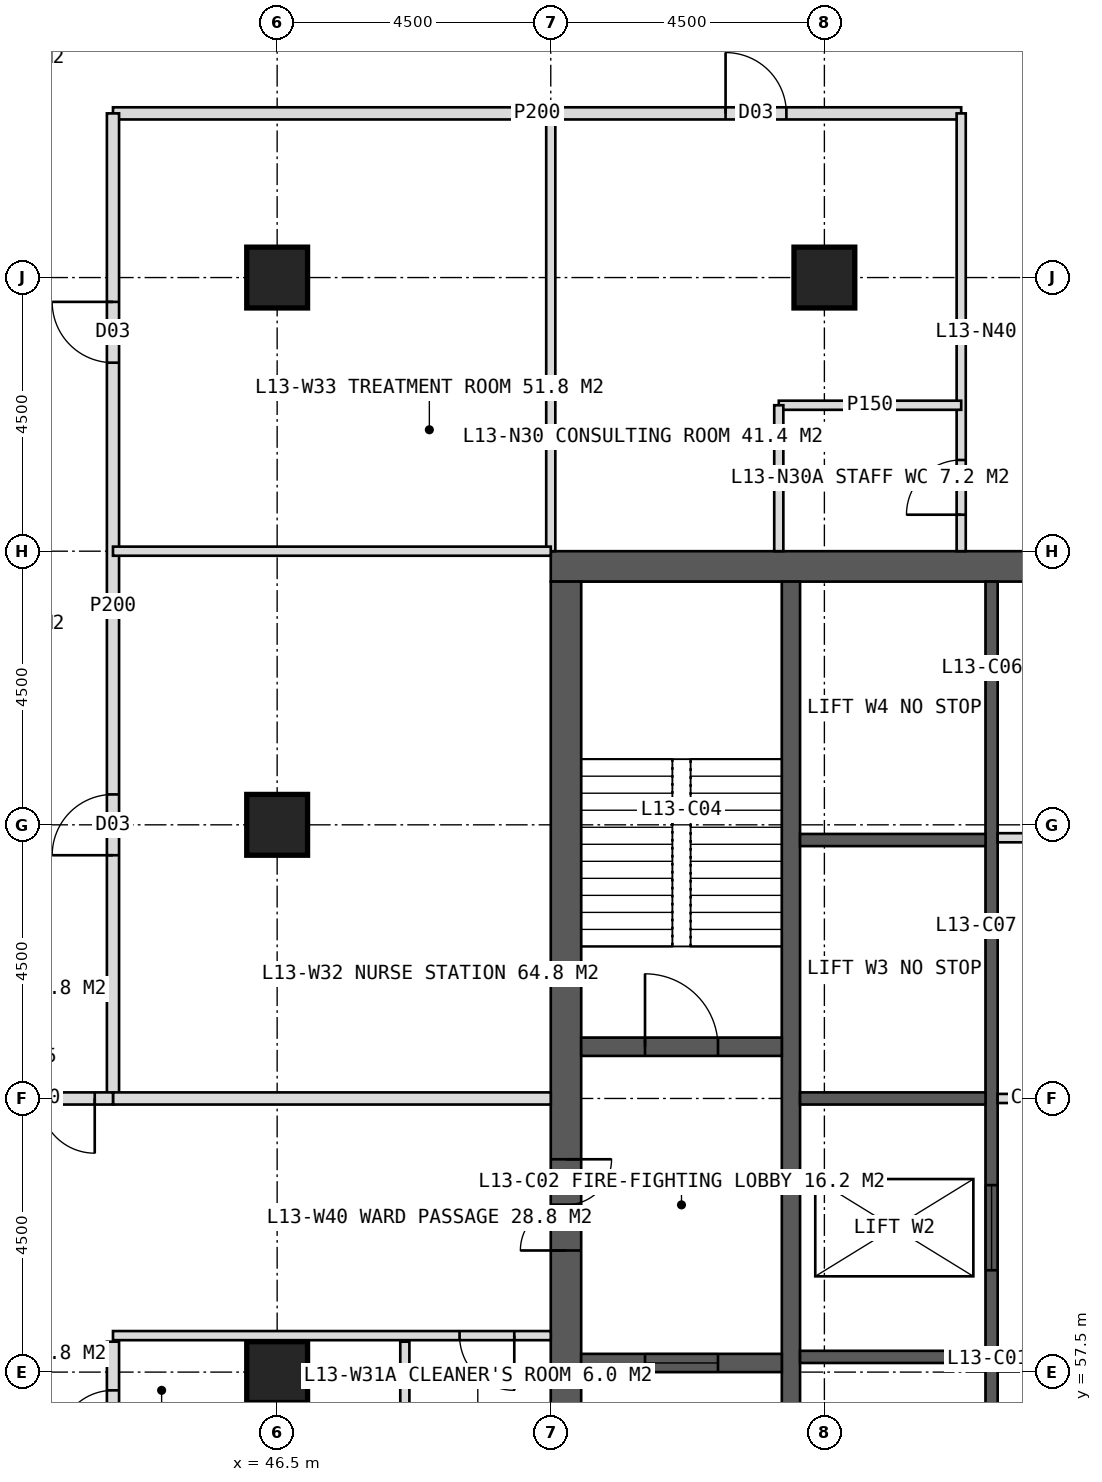
"""IFC4 building model, lengths in metres.
Left out: names, types, materials, properties, quantities, classifications, styles, units other than length and angle.
Written with IfcOpenShell. Run it as: python <this file> out.ifc"""

import sys

from ifc_helpers import new_model, si_unit, direction, frame, frame_2d, origin, origin_2d, place, context, subcontext, project, spatial, rectangle, hollow_rectangle, extrude, element, fill, save


model = new_model("IFC4")
c1 = context("Model", 3, precision=1e-05, world=origin(), true_north=direction((0.0, 1.0)))
c2 = subcontext(c1, "Body", "Model", "MODEL_VIEW")
j1 = project(units=[si_unit("LENGTHUNIT", "METRE"), si_unit("PLANEANGLEUNIT", "RADIAN")], contexts=[c1])
p1 = place(None, origin())
s1 = spatial("IfcSite", under=j1, at=p1, CompositionType="ELEMENT")
p2 = place(p1, origin())
s2 = spatial("IfcBuilding", under=s1, at=p2, CompositionType="ELEMENT")
p3 = place(p2, frame((0.0, 0.0, 59.0)))
s3 = spatial("IfcBuildingStorey", under=s2, at=p3, CompositionType="ELEMENT", Elevation=59.0)
p4 = place(p3, frame((51.0, 70.75, 0.0), z_axis=(0.0, 0.0, 1.0), x_axis=(1.0, 0.0, 0.0)))
e1 = element("IfcWall", 1, at=p4, inside=s3, PredefinedType="SHEAR", context=c2, shape_type="SweptSolid", body=[
    extrude(rectangle(XDim=18.0, YDim=0.5, at=frame_2d((9.0, 0.0))), origin(), (0.0, 0.0, 1.0), 4.0),
])
p5 = place(p4, frame((8.1, 0.0, 0.0)))
e2 = element("IfcOpeningElement", 2, at=p5, cuts=e1, PredefinedType="OPENING", context=c2, shape_type="SweptSolid", body=[
    extrude(rectangle(XDim=1.8, YDim=2.2, at=frame_2d((0.9, 1.1))), frame((0.0, 0.26, 0.0), z_axis=(0.0, -1.0, 0.0), x_axis=(1.0, 0.0, 0.0)), (0.0, 0.0, 1.0), 0.52),
])
p6 = place(p3, frame((51.25, 53.5, 0.0), z_axis=(0.0, 0.0, 1.0), x_axis=(0.0, 1.0, 0.0)))
e3 = element("IfcWall", 3, at=p6, inside=s3, PredefinedType="SHEAR", context=c2, shape_type="SweptSolid", body=[
    extrude(rectangle(XDim=17.0, YDim=0.5, at=frame_2d((8.5, 0.0))), origin(), (0.0, 0.0, 1.0), 4.0),
])
p7 = place(p6, frame((6.0, 0.0, 0.0)))
e4 = element("IfcOpeningElement", 4, at=p7, cuts=e3, PredefinedType="OPENING", context=c2, shape_type="SweptSolid", body=[
    extrude(rectangle(XDim=1.5, YDim=2.2, at=frame_2d((0.75, 1.1))), frame((0.0, 0.26, 0.0), z_axis=(0.0, -1.0, 0.0), x_axis=(1.0, 0.0, 0.0)), (0.0, 0.0, 1.0), 0.52),
])
p8 = place(p3, frame((54.95, 53.5, 0.0), z_axis=(0.0, 0.0, 1.0), x_axis=(0.0, 1.0, 0.0)))
e5 = element("IfcWall", 5, at=p8, inside=s3, PredefinedType="SHEAR", context=c2, shape_type="SweptSolid", body=[
    extrude(rectangle(XDim=17.0, YDim=0.3, at=frame_2d((8.5, 0.0))), origin(), (0.0, 0.0, 1.0), 4.0),
])
p9 = place(p3, frame((58.25, 53.5, 0.0), z_axis=(0.0, 0.0, 1.0), x_axis=(0.0, 1.0, 0.0)))
e6 = element("IfcWall", 6, at=p9, inside=s3, PredefinedType="SHEAR", context=c2, shape_type="SweptSolid", body=[
    extrude(rectangle(XDim=17.0, YDim=0.2, at=frame_2d((8.5, 0.0))), origin(), (0.0, 0.0, 1.0), 4.0),
])
p10 = place(p9, frame((1.375, 0.0, 0.0)))
e7 = element("IfcOpeningElement", 7, at=p10, cuts=e6, PredefinedType="OPENING", context=c2, shape_type="SweptSolid", body=[
    extrude(rectangle(XDim=1.4, YDim=2.2, at=frame_2d((0.7, 1.1))), frame((0.0, 0.11, 0.0), z_axis=(0.0, -1.0, 0.0), x_axis=(1.0, 0.0, 0.0)), (0.0, 0.0, 1.0), 0.22),
])
p11 = place(p9, frame((5.675, 0.0, 0.0)))
e8 = element("IfcOpeningElement", 8, at=p11, cuts=e6, PredefinedType="OPENING", context=c2, shape_type="SweptSolid", body=[
    extrude(rectangle(XDim=1.4, YDim=2.2, at=frame_2d((0.7, 1.1))), frame((0.0, 0.11, 0.0), z_axis=(0.0, -1.0, 0.0), x_axis=(1.0, 0.0, 0.0)), (0.0, 0.0, 1.0), 0.22),
])
for number, where, z_axis, x_axis in (
    (9, (55.1, 57.75, 0.0), (0.0, 0.0, 1.0), (1.0, 0.0, 0.0)),
    (10, (55.1, 62.0, 0.0), (0.0, 0.0, 1.0), (1.0, 0.0, 0.0)),
    (11, (55.1, 66.25, 0.0), (0.0, 0.0, 1.0), (1.0, 0.0, 0.0)),
):
    element("IfcWall", number, at=place(p3, frame(where, z_axis=z_axis, x_axis=x_axis)), inside=s3, PredefinedType="SHEAR", context=c2, shape_type="SweptSolid", body=[
        extrude(rectangle(XDim=3.05, YDim=0.2, at=frame_2d((1.525, 0.0))), origin(), (0.0, 0.0, 1.0), 4.0),
    ])
p12 = place(p3, frame((51.5, 62.85, 0.0), z_axis=(0.0, 0.0, 1.0), x_axis=(1.0, 0.0, 0.0)))
e12 = element("IfcWall", 12, at=p12, inside=s3, PredefinedType="SHEAR", context=c2, shape_type="SweptSolid", body=[
    extrude(rectangle(XDim=3.3, YDim=0.3, at=frame_2d((1.65, 0.0))), origin(), (0.0, 0.0, 1.0), 4.0),
])
p13 = place(p12, frame((1.05, 0.0, 0.0)))
e13 = element("IfcOpeningElement", 13, at=p13, cuts=e12, PredefinedType="OPENING", context=c2, shape_type="SweptSolid", body=[
    extrude(rectangle(XDim=1.2, YDim=2.1, at=frame_2d((0.6, 1.05))), frame((0.0, 0.16, 0.0), z_axis=(0.0, -1.0, 0.0), x_axis=(1.0, 0.0, 0.0)), (0.0, 0.0, 1.0), 0.32),
])
p14 = place(p3, frame((51.5, 57.65, 0.0), z_axis=(0.0, 0.0, 1.0), x_axis=(1.0, 0.0, 0.0)))
e14 = element("IfcWall", 14, at=p14, inside=s3, PredefinedType="SHEAR", context=c2, shape_type="SweptSolid", body=[
    extrude(rectangle(XDim=3.3, YDim=0.3, at=frame_2d((1.65, 0.0))), origin(), (0.0, 0.0, 1.0), 4.0),
])
p15 = place(p14, frame((1.05, 0.0, 0.0)))
e15 = element("IfcOpeningElement", 15, at=p15, cuts=e14, PredefinedType="OPENING", context=c2, shape_type="SweptSolid", body=[
    extrude(rectangle(XDim=1.2, YDim=2.2, at=frame_2d((0.6, 1.1))), frame((0.0, 0.16, 0.0), z_axis=(0.0, -1.0, 0.0), x_axis=(1.0, 0.0, 0.0)), (0.0, 0.0, 1.0), 0.32),
])
for number, where, z_axis, x_axis in (
    (16, (46.5, 75.5, 0.0), (0.0, 0.0, 1.0), (1.0, 0.0, 0.0)),
    (17, (55.5, 75.5, 0.0), (0.0, 0.0, 1.0), (1.0, 0.0, 0.0)),
    (18, (46.5, 57.5, 0.0), (0.0, 0.0, 1.0), (1.0, 0.0, 0.0)),
    (19, (46.5, 66.5, 0.0), (0.0, 0.0, 1.0), (1.0, 0.0, 0.0)),
):
    element("IfcColumn", number, at=place(p3, frame(where, z_axis=z_axis, x_axis=x_axis)), inside=s3, PredefinedType="COLUMN", context=c2, shape_type="SweptSolid", body=[
        extrude(hollow_rectangle(XDim=1.0, YDim=1.0, WallThickness=0.1, at=origin_2d()), origin(), (0.0, 0.0, 1.0), 4.0),
    ])
p16 = place(p3, frame((51.0, 71.0, 0.0), z_axis=(0.0, 0.0, 1.0), x_axis=(0.0, 1.0, 0.0)))
e20 = element("IfcWall", 20, at=p16, inside=s3, PredefinedType="PARTITIONING", context=c2, shape_type="SweptSolid", body=[
    extrude(rectangle(XDim=7.2, YDim=0.15, at=frame_2d((3.6, 0.0))), origin(), (0.0, 0.0, 1.0), 3.75),
])
p17 = place(p3, frame((43.8, 78.2, 0.0), z_axis=(0.0, 0.0, 1.0), x_axis=(1.0, 0.0, 0.0)))
e21 = element("IfcWall", 21, at=p17, inside=s3, PredefinedType="PARTITIONING", context=c2, shape_type="SweptSolid", body=[
    extrude(rectangle(XDim=13.95, YDim=0.2, at=frame_2d((6.975, 0.0))), origin(), (0.0, 0.0, 1.0), 3.75),
])
p18 = place(p17, frame((10.075, 0.0, 0.0)))
e22 = element("IfcOpeningElement", 22, at=p18, cuts=e21, PredefinedType="OPENING", context=c2, shape_type="SweptSolid", body=[
    extrude(rectangle(XDim=1.0, YDim=2.1, at=frame_2d((0.5, 1.05))), frame((0.0, 0.11, 0.0), z_axis=(0.0, -1.0, 0.0), x_axis=(1.0, 0.0, 0.0)), (0.0, 0.0, 1.0), 0.22),
])
p19 = place(p3, frame((57.75, 71.0, 0.0), z_axis=(0.0, 0.0, 1.0), x_axis=(0.0, 1.0, 0.0)))
e23 = element("IfcWall", 23, at=p19, inside=s3, PredefinedType="PARTITIONING", context=c2, shape_type="SweptSolid", body=[
    extrude(rectangle(XDim=7.2, YDim=0.15, at=frame_2d((3.6, 0.0))), origin(), (0.0, 0.0, 1.0), 3.75),
])
p20 = place(p19, frame((0.6, 0.0, 0.0)))
e24 = element("IfcOpeningElement", 24, at=p20, cuts=e23, PredefinedType="OPENING", context=c2, shape_type="SweptSolid", body=[
    extrude(rectangle(XDim=0.9, YDim=2.1, at=frame_2d((0.45, 1.05))), frame((0.0, 0.085, 0.0), z_axis=(0.0, -1.0, 0.0), x_axis=(1.0, 0.0, 0.0)), (0.0, 0.0, 1.0), 0.17),
])
p21 = place(p3, frame((54.75, 73.4, 0.0), z_axis=(0.0, 0.0, 1.0), x_axis=(1.0, 0.0, 0.0)))
e25 = element("IfcWall", 25, at=p21, inside=s3, PredefinedType="PARTITIONING", context=c2, shape_type="SweptSolid", body=[
    extrude(rectangle(XDim=3.0, YDim=0.15, at=frame_2d((1.5, 0.0))), origin(), (0.0, 0.0, 1.0), 3.75),
])
p22 = place(p3, frame((54.75, 71.0, 0.0), z_axis=(0.0, 0.0, 1.0), x_axis=(0.0, 1.0, 0.0)))
e26 = element("IfcWall", 26, at=p22, inside=s3, PredefinedType="PARTITIONING", context=c2, shape_type="SweptSolid", body=[
    extrude(rectangle(XDim=2.4, YDim=0.15, at=frame_2d((1.2, 0.0))), origin(), (0.0, 0.0, 1.0), 3.75),
])
p23 = place(p3, frame((43.8, 45.8, 0.0), z_axis=(0.0, 0.0, 1.0), x_axis=(0.0, 1.0, 0.0)))
e27 = element("IfcWall", 27, at=p23, inside=s3, PredefinedType="PARTITIONING", context=c2, shape_type="SweptSolid", body=[
    extrude(rectangle(XDim=12.2, YDim=0.2, at=frame_2d((6.1, 0.0))), origin(), (0.0, 0.0, 1.0), 3.75),
])
p24 = place(p23, frame((8.0, 0.0, 0.0)))
e28 = element("IfcOpeningElement", 28, at=p24, cuts=e27, PredefinedType="OPENING", context=c2, shape_type="SweptSolid", body=[
    extrude(rectangle(XDim=0.9, YDim=2.1, at=frame_2d((0.45, 1.05))), frame((0.0, 0.11, 0.0), z_axis=(0.0, -1.0, 0.0), x_axis=(1.0, 0.0, 0.0)), (0.0, 0.0, 1.0), 0.22),
])
p25 = place(p23, frame((10.5, 0.0, 0.0)))
e29 = element("IfcOpeningElement", 29, at=p25, cuts=e27, PredefinedType="OPENING", context=c2, shape_type="SweptSolid", body=[
    extrude(rectangle(XDim=0.9, YDim=2.1, at=frame_2d((0.45, 1.05))), frame((0.0, 0.11, 0.0), z_axis=(0.0, -1.0, 0.0), x_axis=(1.0, 0.0, 0.0)), (0.0, 0.0, 1.0), 0.22),
])
p26 = place(p3, frame((43.8, 62.0, 0.0), z_axis=(0.0, 0.0, 1.0), x_axis=(0.0, 1.0, 0.0)))
e30 = element("IfcWall", 30, at=p26, inside=s3, PredefinedType="PARTITIONING", context=c2, shape_type="SweptSolid", body=[
    extrude(rectangle(XDim=16.2, YDim=0.2, at=frame_2d((8.1, 0.0))), origin(), (0.0, 0.0, 1.0), 3.75),
])
p27 = place(p26, frame((4.0, 0.0, 0.0)))
e31 = element("IfcOpeningElement", 31, at=p27, cuts=e30, PredefinedType="OPENING", context=c2, shape_type="SweptSolid", body=[
    extrude(rectangle(XDim=1.0, YDim=2.1, at=frame_2d((0.5, 1.05))), frame((0.0, 0.11, 0.0), z_axis=(0.0, -1.0, 0.0), x_axis=(1.0, 0.0, 0.0)), (0.0, 0.0, 1.0), 0.22),
])
p28 = place(p26, frame((12.1, 0.0, 0.0)))
e32 = element("IfcOpeningElement", 32, at=p28, cuts=e30, PredefinedType="OPENING", context=c2, shape_type="SweptSolid", body=[
    extrude(rectangle(XDim=1.0, YDim=2.1, at=frame_2d((0.5, 1.05))), frame((0.0, 0.11, 0.0), z_axis=(0.0, -1.0, 0.0), x_axis=(1.0, 0.0, 0.0)), (0.0, 0.0, 1.0), 0.22),
])
p29 = place(p3, frame((51.0, 58.1, 0.0), z_axis=(0.0, 0.0, 1.0), x_axis=(-1.0, 0.0, 0.0)))
e33 = element("IfcWall", 33, at=p29, inside=s3, PredefinedType="PARTITIONING", context=c2, shape_type="SweptSolid", body=[
    extrude(rectangle(XDim=7.2, YDim=0.15, at=frame_2d((3.6, 0.0))), origin(), (0.0, 0.0, 1.0), 3.75),
])
p30 = place(p29, frame((0.6, 0.0, 0.0)))
e34 = element("IfcOpeningElement", 34, at=p30, cuts=e33, PredefinedType="OPENING", context=c2, shape_type="SweptSolid", body=[
    extrude(rectangle(XDim=0.9, YDim=2.1, at=frame_2d((0.45, 1.05))), frame((0.0, 0.085, 0.0), z_axis=(0.0, -1.0, 0.0), x_axis=(1.0, 0.0, 0.0)), (0.0, 0.0, 1.0), 0.17),
])
p31 = place(p3, frame((51.0, 62.0, 0.0), z_axis=(0.0, 0.0, 1.0), x_axis=(-1.0, 0.0, 0.0)))
e35 = element("IfcWall", 35, at=p31, inside=s3, PredefinedType="SOLIDWALL", context=c2, shape_type="SweptSolid", body=[
    extrude(rectangle(XDim=7.2, YDim=0.2, at=frame_2d((3.6, 0.0))), origin(), (0.0, 0.0, 1.0), 2.75),
])
p32 = place(p3, frame((51.0, 71.0, 0.0), z_axis=(0.0, 0.0, 1.0), x_axis=(-1.0, 0.0, 0.0)))
e36 = element("IfcWall", 36, at=p32, inside=s3, PredefinedType="PARTITIONING", context=c2, shape_type="SweptSolid", body=[
    extrude(rectangle(XDim=7.2, YDim=0.15, at=frame_2d((3.6, 0.0))), origin(), (0.0, 0.0, 1.0), 3.75),
])
p33 = place(p3, frame((48.6, 55.5, 0.0), z_axis=(0.0, 0.0, 1.0), x_axis=(0.0, 1.0, 0.0)))
e37 = element("IfcWall", 37, at=p33, inside=s3, PredefinedType="PARTITIONING", context=c2, shape_type="SweptSolid", body=[
    extrude(rectangle(XDim=2.5, YDim=0.15, at=frame_2d((1.25, 0.0))), origin(), (0.0, 0.0, 1.0), 3.75),
])
p34 = place(p3, frame((43.8, 62.0, 0.0), z_axis=(0.0, 0.0, 1.0), x_axis=(-1.0, 0.0, 0.0)))
e38 = element("IfcWall", 38, at=p34, inside=s3, PredefinedType="SOLIDWALL", context=c2, shape_type="SweptSolid", body=[
    extrude(rectangle(XDim=2.7, YDim=0.2, at=frame_2d((1.35, 0.0))), origin(), (0.0, 0.0, 1.0), 2.75),
])
p35 = place(p34, frame((0.3, 0.0, 0.0)))
e39 = element("IfcOpeningElement", 39, at=p35, cuts=e38, PredefinedType="OPENING", context=c2, shape_type="SweptSolid", body=[
    extrude(rectangle(XDim=1.8, YDim=2.2, at=frame_2d((0.9, 1.1))), frame((0.0, 0.11, 0.0), z_axis=(0.0, -1.0, 0.0), x_axis=(1.0, 0.0, 0.0)), (0.0, 0.0, 1.0), 0.22),
])
p36 = place(p3, frame((58.35, 62.0, 0.0), z_axis=(0.0, 0.0, 1.0), x_axis=(1.0, 0.0, 0.0)))
e40 = element("IfcWall", 40, at=p36, inside=s3, PredefinedType="PARTITIONING", context=c2, shape_type="SweptSolid", body=[
    extrude(rectangle(XDim=3.3, YDim=0.15, at=frame_2d((1.65, 0.0))), origin(), (0.0, 0.0, 1.0), 3.75),
])
p37 = place(p36, frame((1.15, 0.0, 0.0)))
e41 = element("IfcOpeningElement", 41, at=p37, cuts=e40, PredefinedType="OPENING", context=c2, shape_type="SweptSolid", body=[
    extrude(rectangle(XDim=1.0, YDim=2.1, at=frame_2d((0.5, 1.05))), frame((0.0, 0.085, 0.0), z_axis=(0.0, -1.0, 0.0), x_axis=(1.0, 0.0, 0.0)), (0.0, 0.0, 1.0), 0.17),
])
p38 = place(p3, frame((58.35, 66.288, 0.0), z_axis=(0.0, 0.0, 1.0), x_axis=(1.0, 0.0, 0.0)))
e42 = element("IfcWall", 42, at=p38, inside=s3, PredefinedType="PARTITIONING", context=c2, shape_type="SweptSolid", body=[
    extrude(rectangle(XDim=3.3, YDim=0.15, at=frame_2d((1.65, 0.0))), origin(), (0.0, 0.0, 1.0), 3.75),
])
p39 = place(p20, origin())
e43 = element("IfcDoor", 43, at=p39, inside=s3, OperationType="SINGLE_SWING_LEFT", PredefinedType="DOOR", context=c2, shape_type="SweptSolid", body=[
    extrude(rectangle(XDim=0.9, YDim=2.1, at=frame_2d((0.45, 1.05))), frame((0.0, 0.025, 0.0), z_axis=(0.0, -1.0, 0.0), x_axis=(1.0, 0.0, 0.0)), (0.0, 0.0, 1.0), 0.05),
])
fill(e24, e43)
p40 = place(p18, origin())
e44 = element("IfcDoor", 44, at=p40, inside=s3, OperationType="SINGLE_SWING_LEFT", PredefinedType="DOOR", context=c2, shape_type="SweptSolid", body=[
    extrude(rectangle(XDim=1.0, YDim=2.1, at=frame_2d((0.5, 1.05))), frame((0.0, 0.025, 0.0), z_axis=(0.0, -1.0, 0.0), x_axis=(1.0, 0.0, 0.0)), (0.0, 0.0, 1.0), 0.05),
])
fill(e22, e44)
p41 = place(p30, origin())
e45 = element("IfcDoor", 45, at=p41, inside=s3, OperationType="SINGLE_SWING_LEFT", PredefinedType="DOOR", context=c2, shape_type="SweptSolid", body=[
    extrude(rectangle(XDim=0.9, YDim=2.1, at=frame_2d((0.45, 1.05))), frame((0.0, 0.025, 0.0), z_axis=(0.0, -1.0, 0.0), x_axis=(1.0, 0.0, 0.0)), (0.0, 0.0, 1.0), 0.05),
])
fill(e34, e45)
p42 = place(p25, origin())
e46 = element("IfcDoor", 46, at=p42, inside=s3, OperationType="SINGLE_SWING_LEFT", PredefinedType="DOOR", context=c2, shape_type="SweptSolid", body=[
    extrude(rectangle(XDim=0.9, YDim=2.1, at=frame_2d((0.45, 1.05))), frame((0.0, 0.025, 0.0), z_axis=(0.0, -1.0, 0.0), x_axis=(1.0, 0.0, 0.0)), (0.0, 0.0, 1.0), 0.05),
])
fill(e29, e46)
p43 = place(p27, origin())
e47 = element("IfcDoor", 47, at=p43, inside=s3, OperationType="SINGLE_SWING_LEFT", PredefinedType="DOOR", context=c2, shape_type="SweptSolid", body=[
    extrude(rectangle(XDim=1.0, YDim=2.1, at=frame_2d((0.5, 1.05))), frame((0.0, 0.025, 0.0), z_axis=(0.0, -1.0, 0.0), x_axis=(1.0, 0.0, 0.0)), (0.0, 0.0, 1.0), 0.05),
])
fill(e31, e47)
p44 = place(p28, origin())
e48 = element("IfcDoor", 48, at=p44, inside=s3, OperationType="SINGLE_SWING_RIGHT", PredefinedType="DOOR", context=c2, shape_type="SweptSolid", body=[
    extrude(rectangle(XDim=1.0, YDim=2.1, at=frame_2d((0.5, 1.05))), frame((0.0, 0.025, 0.0), z_axis=(0.0, -1.0, 0.0), x_axis=(1.0, 0.0, 0.0)), (0.0, 0.0, 1.0), 0.05),
])
fill(e32, e48)
p45 = place(p35, origin())
e49 = element("IfcDoor", 49, at=p45, inside=s3, OperationType="DOUBLE_DOOR_DOUBLE_SWING", PredefinedType="DOOR", context=c2, shape_type="SweptSolid", body=[
    extrude(rectangle(XDim=1.8, YDim=2.2, at=frame_2d((0.9, 1.1))), frame((0.0, 0.025, 0.0), z_axis=(0.0, -1.0, 0.0), x_axis=(1.0, 0.0, 0.0)), (0.0, 0.0, 1.0), 0.05),
])
fill(e39, e49)
p46 = place(p7, origin())
e50 = element("IfcDoor", 50, at=p46, inside=s3, OperationType="DOUBLE_DOOR_SINGLE_SWING", PredefinedType="DOOR", context=c2, shape_type="SweptSolid", body=[
    extrude(rectangle(XDim=1.5, YDim=2.2, at=frame_2d((0.75, 1.1))), frame((0.0, 0.025, 0.0), z_axis=(0.0, -1.0, 0.0), x_axis=(1.0, 0.0, 0.0)), (0.0, 0.0, 1.0), 0.05),
])
fill(e4, e50)
p47 = place(p13, origin())
e51 = element("IfcDoor", 51, at=p47, inside=s3, OperationType="SINGLE_SWING_LEFT", PredefinedType="DOOR", context=c2, shape_type="SweptSolid", body=[
    extrude(rectangle(XDim=1.2, YDim=2.1, at=frame_2d((0.6, 1.05))), frame((0.0, 0.025, 0.0), z_axis=(0.0, -1.0, 0.0), x_axis=(1.0, 0.0, 0.0)), (0.0, 0.0, 1.0), 0.05),
])
fill(e13, e51)
p48 = place(p15, origin())
e52 = element("IfcDoor", 52, at=p48, inside=s3, OperationType="SLIDING_TO_LEFT", PredefinedType="DOOR", context=c2, shape_type="SweptSolid", body=[
    extrude(rectangle(XDim=1.2, YDim=2.2, at=frame_2d((0.6, 1.1))), frame((0.0, 0.025, 0.0), z_axis=(0.0, -1.0, 0.0), x_axis=(1.0, 0.0, 0.0)), (0.0, 0.0, 1.0), 0.05),
])
fill(e15, e52)
p49 = place(p11, origin())
e53 = element("IfcDoor", 53, at=p49, inside=s3, OperationType="SLIDING_TO_LEFT", PredefinedType="DOOR", context=c2, shape_type="SweptSolid", body=[
    extrude(rectangle(XDim=1.4, YDim=2.2, at=frame_2d((0.7, 1.1))), frame((0.0, 0.025, 0.0), z_axis=(0.0, -1.0, 0.0), x_axis=(1.0, 0.0, 0.0)), (0.0, 0.0, 1.0), 0.05),
])
fill(e8, e53)
save(model, sys.argv[1])
